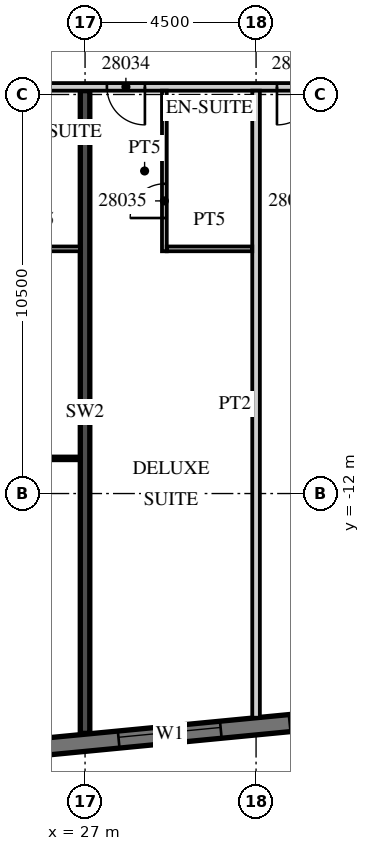
"""IFC4 building model, lengths in metres.
Left out: names, types, materials, properties, quantities, classifications, styles, units other than length and angle.
Written with IfcOpenShell. Run it as: python <this file> out.ifc"""

import sys

from ifc_helpers import new_model, si_unit, direction, frame, frame_2d, origin, place, context, subcontext, project, spatial, rectangle, extrude, element, fill, save


model = new_model("IFC4")
c1 = context("Model", 3, precision=1e-05, world=origin(), true_north=direction((0.0, 1.0)))
c2 = subcontext(c1, "Body", "Model", "MODEL_VIEW")
j1 = project(units=[si_unit("LENGTHUNIT", "METRE"), si_unit("PLANEANGLEUNIT", "RADIAN")], contexts=[c1])
p1 = place(None, origin())
s1 = spatial("IfcSite", under=j1, at=p1, CompositionType="ELEMENT")
p2 = place(p1, origin())
s2 = spatial("IfcBuilding", under=s1, at=p2, CompositionType="ELEMENT")
p3 = place(p2, frame((0.0, 0.0, 127.3)))
s3 = spatial("IfcBuildingStorey", under=s2, at=p3, CompositionType="ELEMENT", Elevation=127.3)
p4 = place(p3, frame((27.0, -18.311, 0.0), z_axis=(0.0, 0.0, 1.0), x_axis=(0.0, 1.0, 0.0)))
e1 = element("IfcWall", 1, at=p4, inside=s3, PredefinedType="SHEAR", context=c2, shape_type="SweptSolid", body=[
    extrude(rectangle(XDim=16.911, YDim=0.25, at=frame_2d((8.455, 0.0))), origin(), (0.0, 0.0, 1.0), 3.3),
])
p5 = place(p3, frame((-13.521, -22.46, 0.0), z_axis=(0.0, 0.0, 1.0), x_axis=(0.995396096335, 0.095846812164, 0.0)))
e2 = element("IfcWall", 2, at=p5, inside=s3, PredefinedType="SOLIDWALL", context=c2, shape_type="SweptSolid", body=[
    extrude(rectangle(XDim=59.151, YDim=0.45, at=frame_2d((29.575, 0.0))), origin(), (0.0, 0.0, 1.0), 3.02),
])
p6 = place(p5, frame((0.91, 0.0, 0.45)))
e3 = element("IfcOpeningElement", 3, at=p6, cuts=e2, PredefinedType="OPENING", context=c2, shape_type="SweptSolid", body=[
    extrude(rectangle(XDim=2.7, YDim=2.25, at=frame_2d((1.35, 1.125))), frame((0.0, 0.235, 0.0), z_axis=(0.0, -1.0, 0.0), x_axis=(1.0, 0.0, 0.0)), (0.0, 0.0, 1.0), 0.47),
])
p7 = place(p5, frame((5.431, 0.0, 0.45)))
e4 = element("IfcOpeningElement", 4, at=p7, cuts=e2, PredefinedType="OPENING", context=c2, shape_type="SweptSolid", body=[
    extrude(rectangle(XDim=2.7, YDim=2.25, at=frame_2d((1.35, 1.125))), frame((0.0, 0.235, 0.0), z_axis=(0.0, -1.0, 0.0), x_axis=(1.0, 0.0, 0.0)), (0.0, 0.0, 1.0), 0.47),
])
p8 = place(p5, frame((9.952, 0.0, 0.45)))
e5 = element("IfcOpeningElement", 5, at=p8, cuts=e2, PredefinedType="OPENING", context=c2, shape_type="SweptSolid", body=[
    extrude(rectangle(XDim=2.7, YDim=2.25, at=frame_2d((1.35, 1.125))), frame((0.0, 0.235, 0.0), z_axis=(0.0, -1.0, 0.0), x_axis=(1.0, 0.0, 0.0)), (0.0, 0.0, 1.0), 0.47),
])
p9 = place(p5, frame((14.473, 0.0, 0.45)))
e6 = element("IfcOpeningElement", 6, at=p9, cuts=e2, PredefinedType="OPENING", context=c2, shape_type="SweptSolid", body=[
    extrude(rectangle(XDim=2.7, YDim=2.25, at=frame_2d((1.35, 1.125))), frame((0.0, 0.235, 0.0), z_axis=(0.0, -1.0, 0.0), x_axis=(1.0, 0.0, 0.0)), (0.0, 0.0, 1.0), 0.47),
])
p10 = place(p5, frame((18.994, 0.0, 0.45)))
e7 = element("IfcOpeningElement", 7, at=p10, cuts=e2, PredefinedType="OPENING", context=c2, shape_type="SweptSolid", body=[
    extrude(rectangle(XDim=2.7, YDim=2.25, at=frame_2d((1.35, 1.125))), frame((0.0, 0.235, 0.0), z_axis=(0.0, -1.0, 0.0), x_axis=(1.0, 0.0, 0.0)), (0.0, 0.0, 1.0), 0.47),
])
p11 = place(p5, frame((23.514, 0.0, 0.45)))
e8 = element("IfcOpeningElement", 8, at=p11, cuts=e2, PredefinedType="OPENING", context=c2, shape_type="SweptSolid", body=[
    extrude(rectangle(XDim=2.7, YDim=2.25, at=frame_2d((1.35, 1.125))), frame((0.0, 0.235, 0.0), z_axis=(0.0, -1.0, 0.0), x_axis=(1.0, 0.0, 0.0)), (0.0, 0.0, 1.0), 0.47),
])
p12 = place(p5, frame((28.035, 0.0, 0.45)))
e9 = element("IfcOpeningElement", 9, at=p12, cuts=e2, PredefinedType="OPENING", context=c2, shape_type="SweptSolid", body=[
    extrude(rectangle(XDim=2.7, YDim=2.25, at=frame_2d((1.35, 1.125))), frame((0.0, 0.235, 0.0), z_axis=(0.0, -1.0, 0.0), x_axis=(1.0, 0.0, 0.0)), (0.0, 0.0, 1.0), 0.47),
])
p13 = place(p5, frame((32.556, 0.0, 0.45)))
e10 = element("IfcOpeningElement", 10, at=p13, cuts=e2, PredefinedType="OPENING", context=c2, shape_type="SweptSolid", body=[
    extrude(rectangle(XDim=2.7, YDim=2.25, at=frame_2d((1.35, 1.125))), frame((0.0, 0.235, 0.0), z_axis=(0.0, -1.0, 0.0), x_axis=(1.0, 0.0, 0.0)), (0.0, 0.0, 1.0), 0.47),
])
p14 = place(p5, frame((37.077, 0.0, 0.45)))
e11 = element("IfcOpeningElement", 11, at=p14, cuts=e2, PredefinedType="OPENING", context=c2, shape_type="SweptSolid", body=[
    extrude(rectangle(XDim=2.7, YDim=2.25, at=frame_2d((1.35, 1.125))), frame((0.0, 0.235, 0.0), z_axis=(0.0, -1.0, 0.0), x_axis=(1.0, 0.0, 0.0)), (0.0, 0.0, 1.0), 0.47),
])
p15 = place(p5, frame((41.598, 0.0, 0.45)))
e12 = element("IfcOpeningElement", 12, at=p15, cuts=e2, PredefinedType="OPENING", context=c2, shape_type="SweptSolid", body=[
    extrude(rectangle(XDim=2.7, YDim=2.25, at=frame_2d((1.35, 1.125))), frame((0.0, 0.235, 0.0), z_axis=(0.0, -1.0, 0.0), x_axis=(1.0, 0.0, 0.0)), (0.0, 0.0, 1.0), 0.47),
])
p16 = place(p5, frame((46.118, 0.0, 0.45)))
e13 = element("IfcOpeningElement", 13, at=p16, cuts=e2, PredefinedType="OPENING", context=c2, shape_type="SweptSolid", body=[
    extrude(rectangle(XDim=2.7, YDim=2.25, at=frame_2d((1.35, 1.125))), frame((0.0, 0.235, 0.0), z_axis=(0.0, -1.0, 0.0), x_axis=(1.0, 0.0, 0.0)), (0.0, 0.0, 1.0), 0.47),
])
p17 = place(p5, frame((50.639, 0.0, 0.45)))
e14 = element("IfcOpeningElement", 14, at=p17, cuts=e2, PredefinedType="OPENING", context=c2, shape_type="SweptSolid", body=[
    extrude(rectangle(XDim=2.7, YDim=2.25, at=frame_2d((1.35, 1.125))), frame((0.0, 0.235, 0.0), z_axis=(0.0, -1.0, 0.0), x_axis=(1.0, 0.0, 0.0)), (0.0, 0.0, 1.0), 0.47),
])
p18 = place(p5, frame((55.15, 0.0, 0.45)))
e15 = element("IfcOpeningElement", 15, at=p18, cuts=e2, PredefinedType="OPENING", context=c2, shape_type="SweptSolid", body=[
    extrude(rectangle(XDim=2.7, YDim=2.25, at=frame_2d((1.35, 1.125))), frame((0.0, 0.235, 0.0), z_axis=(0.0, -1.0, 0.0), x_axis=(1.0, 0.0, 0.0)), (0.0, 0.0, 1.0), 0.47),
])
p19 = place(p3, frame((-13.5, -1.3, 0.0), z_axis=(0.0, 0.0, 1.0), x_axis=(1.0, 0.0, 0.0)))
e16 = element("IfcWall", 16, at=p19, inside=s3, PredefinedType="PARTITIONING", context=c2, shape_type="SweptSolid", body=[
    extrude(rectangle(XDim=60.932, YDim=0.2, at=frame_2d((30.466, 0.0))), origin(), (0.0, 0.0, 1.0), 3.02),
])
p20 = place(p19, frame((2.925, 0.0, 0.0)))
e17 = element("IfcOpeningElement", 17, at=p20, cuts=e16, PredefinedType="OPENING", context=c2, shape_type="SweptSolid", body=[
    extrude(rectangle(XDim=1.0, YDim=2.1, at=frame_2d((0.5, 1.05))), frame((0.0, 0.11, 0.0), z_axis=(0.0, -1.0, 0.0), x_axis=(1.0, 0.0, 0.0)), (0.0, 0.0, 1.0), 0.22),
])
p21 = place(p19, frame((9.863, 0.0, 0.0)))
e18 = element("IfcOpeningElement", 18, at=p21, cuts=e16, PredefinedType="OPENING", context=c2, shape_type="SweptSolid", body=[
    extrude(rectangle(XDim=1.2, YDim=2.1, at=frame_2d((0.6, 1.05))), frame((0.0, 0.11, 0.0), z_axis=(0.0, -1.0, 0.0), x_axis=(1.0, 0.0, 0.0)), (0.0, 0.0, 1.0), 0.22),
])
p22 = place(p19, frame((15.938, 0.0, 0.0)))
e19 = element("IfcOpeningElement", 19, at=p22, cuts=e16, PredefinedType="OPENING", context=c2, shape_type="SweptSolid", body=[
    extrude(rectangle(XDim=1.2, YDim=2.1, at=frame_2d((0.6, 1.05))), frame((0.0, 0.11, 0.0), z_axis=(0.0, -1.0, 0.0), x_axis=(1.0, 0.0, 0.0)), (0.0, 0.0, 1.0), 0.22),
])
p23 = place(p19, frame((27.862, 0.0, 0.0)))
e20 = element("IfcOpeningElement", 20, at=p23, cuts=e16, PredefinedType="OPENING", context=c2, shape_type="SweptSolid", body=[
    extrude(rectangle(XDim=1.2, YDim=2.1, at=frame_2d((0.6, 1.05))), frame((0.0, 0.11, 0.0), z_axis=(0.0, -1.0, 0.0), x_axis=(1.0, 0.0, 0.0)), (0.0, 0.0, 1.0), 0.22),
])
p24 = place(p19, frame((34.45, 0.0, 0.0)))
e21 = element("IfcOpeningElement", 21, at=p24, cuts=e16, PredefinedType="OPENING", context=c2, shape_type="SweptSolid", body=[
    extrude(rectangle(XDim=1.0, YDim=2.1, at=frame_2d((0.5, 1.05))), frame((0.0, 0.11, 0.0), z_axis=(0.0, -1.0, 0.0), x_axis=(1.0, 0.0, 0.0)), (0.0, 0.0, 1.0), 0.22),
])
p25 = place(p19, frame((36.55, 0.0, 0.0)))
e22 = element("IfcOpeningElement", 22, at=p25, cuts=e16, PredefinedType="OPENING", context=c2, shape_type="SweptSolid", body=[
    extrude(rectangle(XDim=1.0, YDim=2.1, at=frame_2d((0.5, 1.05))), frame((0.0, 0.11, 0.0), z_axis=(0.0, -1.0, 0.0), x_axis=(1.0, 0.0, 0.0)), (0.0, 0.0, 1.0), 0.22),
])
p26 = place(p19, frame((41.075, 0.0, 0.0)))
e23 = element("IfcOpeningElement", 23, at=p26, cuts=e16, PredefinedType="OPENING", context=c2, shape_type="SweptSolid", body=[
    extrude(rectangle(XDim=1.0, YDim=2.1, at=frame_2d((0.5, 1.05))), frame((0.0, 0.11, 0.0), z_axis=(0.0, -1.0, 0.0), x_axis=(1.0, 0.0, 0.0)), (0.0, 0.0, 1.0), 0.22),
])
p27 = place(p19, frame((45.55, 0.0, 0.0)))
e24 = element("IfcOpeningElement", 24, at=p27, cuts=e16, PredefinedType="OPENING", context=c2, shape_type="SweptSolid", body=[
    extrude(rectangle(XDim=1.0, YDim=2.1, at=frame_2d((0.5, 1.05))), frame((0.0, 0.11, 0.0), z_axis=(0.0, -1.0, 0.0), x_axis=(1.0, 0.0, 0.0)), (0.0, 0.0, 1.0), 0.22),
])
p28 = place(p19, frame((50.075, 0.0, 0.0)))
e25 = element("IfcOpeningElement", 25, at=p28, cuts=e16, PredefinedType="OPENING", context=c2, shape_type="SweptSolid", body=[
    extrude(rectangle(XDim=1.0, YDim=2.1, at=frame_2d((0.5, 1.05))), frame((0.0, 0.11, 0.0), z_axis=(0.0, -1.0, 0.0), x_axis=(1.0, 0.0, 0.0)), (0.0, 0.0, 1.0), 0.22),
])
p29 = place(p19, frame((54.575, 0.0, 0.0)))
e26 = element("IfcOpeningElement", 26, at=p29, cuts=e16, PredefinedType="OPENING", context=c2, shape_type="SweptSolid", body=[
    extrude(rectangle(XDim=1.0, YDim=2.1, at=frame_2d((0.5, 1.05))), frame((0.0, 0.11, 0.0), z_axis=(0.0, -1.0, 0.0), x_axis=(1.0, 0.0, 0.0)), (0.0, 0.0, 1.0), 0.22),
])
p30 = place(p19, frame((59.882, 0.0, 0.0)))
e27 = element("IfcOpeningElement", 27, at=p30, cuts=e16, PredefinedType="OPENING", context=c2, shape_type="SweptSolid", body=[
    extrude(rectangle(XDim=0.9, YDim=2.1, at=frame_2d((0.45, 1.05))), frame((0.0, 0.11, 0.0), z_axis=(0.0, -1.0, 0.0), x_axis=(1.0, 0.0, 0.0)), (0.0, 0.0, 1.0), 0.22),
])
p31 = place(p3, frame((24.625, -5.562, 0.0), z_axis=(0.0, 0.0, 1.0), x_axis=(1.0, 0.0, 0.0)))
e28 = element("IfcWall", 28, at=p31, inside=s3, PredefinedType="PARTITIONING", context=c2, shape_type="SweptSolid", body=[
    extrude(rectangle(XDim=2.25, YDim=0.125, at=frame_2d((1.125, 0.0))), origin(), (0.0, 0.0, 1.0), 3.02),
])
p32 = place(p3, frame((22.6, -11.075, 0.0), z_axis=(0.0, 0.0, 1.0), x_axis=(1.0, 0.0, 0.0)))
e29 = element("IfcWall", 29, at=p32, inside=s3, PredefinedType="PARTITIONING", context=c2, shape_type="SweptSolid", body=[
    extrude(rectangle(XDim=4.275, YDim=0.1, at=frame_2d((2.137, 0.0))), origin(), (0.0, 0.0, 1.0), 3.02),
])
p33 = place(p32, frame((0.787, 0.0, 0.0)))
e30 = element("IfcOpeningElement", 30, at=p33, cuts=e29, PredefinedType="OPENING", context=c2, shape_type="SweptSolid", body=[
    extrude(rectangle(XDim=1.5, YDim=2.1, at=frame_2d((0.75, 1.05))), frame((0.0, 0.06, 0.0), z_axis=(0.0, -1.0, 0.0), x_axis=(1.0, 0.0, 0.0)), (0.0, 0.0, 1.0), 0.12),
])
p34 = place(p3, frame((31.5, -17.899, 0.0), z_axis=(0.0, 0.0, 1.0), x_axis=(0.0, 1.0, 0.0)))
e31 = element("IfcWall", 31, at=p34, inside=s3, PredefinedType="PARTITIONING", context=c2, shape_type="SweptSolid", body=[
    extrude(rectangle(XDim=16.499, YDim=0.2, at=frame_2d((8.25, 0.0))), origin(), (0.0, 0.0, 1.0), 3.02),
])
p35 = place(p3, frame((29.087, -5.625, 0.0), z_axis=(0.0, 0.0, 1.0), x_axis=(0.0, 1.0, 0.0)))
e32 = element("IfcWall", 32, at=p35, inside=s3, PredefinedType="PARTITIONING", context=c2, shape_type="SweptSolid", body=[
    extrude(rectangle(XDim=4.225, YDim=0.125, at=frame_2d((2.113, 0.0))), origin(), (0.0, 0.0, 1.0), 3.02),
])
p36 = place(p35, frame((0.875, 0.0, 0.0)))
e33 = element("IfcOpeningElement", 33, at=p36, cuts=e32, PredefinedType="OPENING", context=c2, shape_type="SweptSolid", body=[
    extrude(rectangle(XDim=0.9, YDim=2.1, at=frame_2d((0.45, 1.05))), frame((0.0, 0.073, 0.0), z_axis=(0.0, -1.0, 0.0), x_axis=(1.0, 0.0, 0.0)), (0.0, 0.0, 1.0), 0.145),
])
p37 = place(p3, frame((29.15, -5.562, 0.0), z_axis=(0.0, 0.0, 1.0), x_axis=(1.0, 0.0, 0.0)))
e34 = element("IfcWall", 34, at=p37, inside=s3, PredefinedType="PARTITIONING", context=c2, shape_type="SweptSolid", body=[
    extrude(rectangle(XDim=2.25, YDim=0.125, at=frame_2d((1.125, 0.0))), origin(), (0.0, 0.0, 1.0), 3.02),
])
p38 = place(p15, origin())
e35 = element("IfcWindow", 35, at=p38, inside=s3, PartitioningType="SINGLE_PANEL", PredefinedType="WINDOW", context=c2, shape_type="SweptSolid", body=[
    extrude(rectangle(XDim=2.7, YDim=2.25, at=frame_2d((1.35, 1.125))), frame((0.0, 0.09, 0.0), z_axis=(0.0, -1.0, 0.0), x_axis=(1.0, 0.0, 0.0)), (0.0, 0.0, 1.0), 0.06),
])
fill(e12, e35)
p39 = place(p16, origin())
e36 = element("IfcWindow", 36, at=p39, inside=s3, PartitioningType="SINGLE_PANEL", PredefinedType="WINDOW", context=c2, shape_type="SweptSolid", body=[
    extrude(rectangle(XDim=2.7, YDim=2.25, at=frame_2d((1.35, 1.125))), frame((0.0, 0.09, 0.0), z_axis=(0.0, -1.0, 0.0), x_axis=(1.0, 0.0, 0.0)), (0.0, 0.0, 1.0), 0.06),
])
fill(e13, e36)
p40 = place(p26, origin())
e37 = element("IfcDoor", 37, at=p40, inside=s3, OperationType="SINGLE_SWING_RIGHT", PredefinedType="DOOR", context=c2, shape_type="SweptSolid", body=[
    extrude(rectangle(XDim=1.0, YDim=2.1, at=frame_2d((0.5, 1.05))), frame((0.0, 0.025, 0.0), z_axis=(0.0, -1.0, 0.0), x_axis=(1.0, 0.0, 0.0)), (0.0, 0.0, 1.0), 0.05),
])
fill(e23, e37)
p41 = place(p36, origin())
e38 = element("IfcDoor", 38, at=p41, inside=s3, OperationType="SINGLE_SWING_LEFT", PredefinedType="DOOR", context=c2, shape_type="SweptSolid", body=[
    extrude(rectangle(XDim=0.9, YDim=2.1, at=frame_2d((0.45, 1.05))), frame((0.0, 0.025, 0.0), z_axis=(0.0, -1.0, 0.0), x_axis=(1.0, 0.0, 0.0)), (0.0, 0.0, 1.0), 0.05),
])
fill(e33, e38)
p42 = place(p27, origin())
e39 = element("IfcDoor", 39, at=p42, inside=s3, OperationType="SINGLE_SWING_LEFT", PredefinedType="DOOR", context=c2, shape_type="SweptSolid", body=[
    extrude(rectangle(XDim=1.0, YDim=2.1, at=frame_2d((0.5, 1.05))), frame((0.0, 0.025, 0.0), z_axis=(0.0, -1.0, 0.0), x_axis=(1.0, 0.0, 0.0)), (0.0, 0.0, 1.0), 0.05),
])
fill(e24, e39)
save(model, sys.argv[1])
